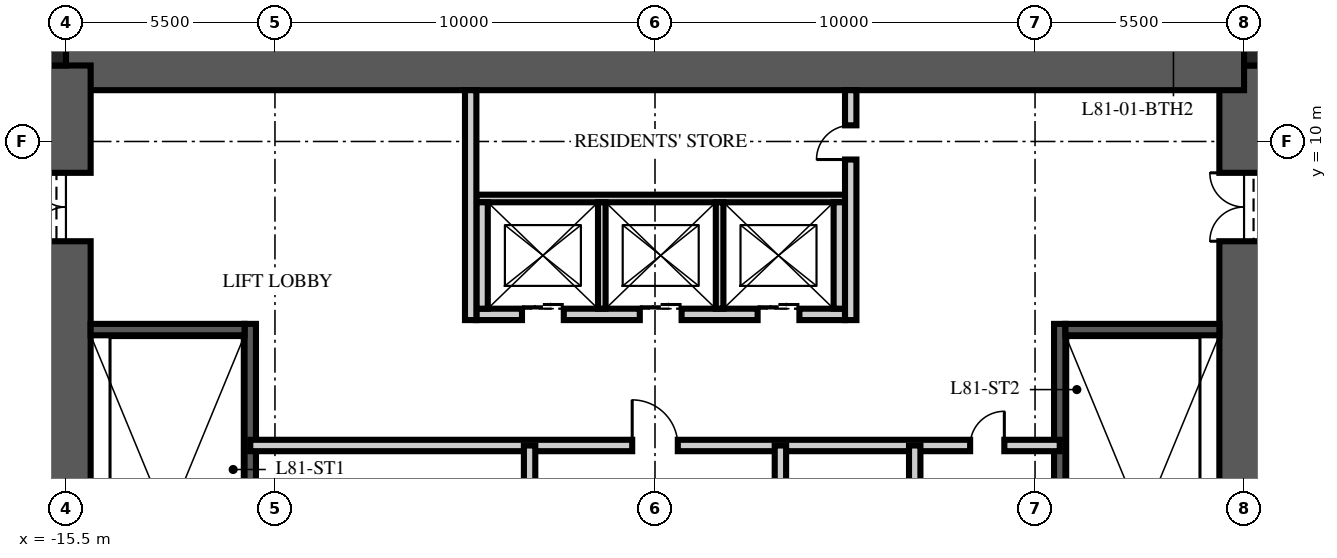
"""IFC4 building model, lengths in metres.
Left out: names, types, materials, properties, quantities, classifications, styles, units other than length and angle.
Written with IfcOpenShell. Run it as: python <this file> out.ifc"""

import sys

from ifc_helpers import new_model, si_unit, direction, frame, frame_2d, origin, origin_2d, place, context, subcontext, project, spatial, rectangle, extrude, element, fill, save


model = new_model("IFC4")
c1 = context("Model", 3, precision=1e-05, world=origin(), true_north=direction((0.0, 1.0)))
c2 = subcontext(c1, "Body", "Model", "MODEL_VIEW")
j1 = project(units=[si_unit("LENGTHUNIT", "METRE"), si_unit("PLANEANGLEUNIT", "RADIAN")], contexts=[c1])
p1 = place(None, origin())
s1 = spatial("IfcSite", under=j1, at=p1, CompositionType="ELEMENT")
p2 = place(p1, origin())
s2 = spatial("IfcBuilding", under=s1, at=p2, CompositionType="ELEMENT")
p3 = place(p2, frame((0.0, 0.0, 323.25)))
s3 = spatial("IfcBuildingStorey", under=s2, at=p3, CompositionType="ELEMENT", Elevation=323.25)
p4 = place(p3, frame((15.5, -12.0, -0.25), z_axis=(0.0, 0.0, 1.0), x_axis=(0.0, 1.0, 0.0)))
e1 = element("IfcWall", 1, at=p4, inside=s3, PredefinedType="SHEAR", context=c2, shape_type="SweptSolid", body=[
    extrude(rectangle(XDim=24.0, YDim=1.3, at=frame_2d((12.0, 0.0))), origin(), (0.0, 0.0, 1.0), 3.75),
])
p5 = place(p4, frame((3.125, 0.0, 0.25)))
e2 = element("IfcOpeningElement", 2, at=p5, cuts=e1, PredefinedType="OPENING", context=c2, shape_type="SweptSolid", body=[
    extrude(rectangle(XDim=1.2, YDim=2.1, at=frame_2d((0.6, 1.05))), frame((0.0, 0.66, 0.0), z_axis=(0.0, -1.0, 0.0), x_axis=(1.0, 0.0, 0.0)), (0.0, 0.0, 1.0), 1.32),
])
p6 = place(p4, frame((19.375, 0.0, 0.25)))
e3 = element("IfcOpeningElement", 3, at=p6, cuts=e1, PredefinedType="OPENING", context=c2, shape_type="SweptSolid", body=[
    extrude(rectangle(XDim=1.8, YDim=2.1, at=frame_2d((0.9, 1.05))), frame((0.0, 0.66, 0.0), z_axis=(0.0, -1.0, 0.0), x_axis=(1.0, 0.0, 0.0)), (0.0, 0.0, 1.0), 1.32),
])
p7 = place(p3, frame((-15.5, 12.0, -0.25), z_axis=(0.0, 0.0, 1.0), x_axis=(1.0, 0.0, 0.0)))
e4 = element("IfcWall", 4, at=p7, inside=s3, PredefinedType="SHEAR", context=c2, shape_type="SweptSolid", body=[
    extrude(rectangle(XDim=31.0, YDim=1.3, at=frame_2d((15.5, 0.0))), origin(), (0.0, 0.0, 1.0), 3.75),
])
p8 = place(p3, frame((-15.5, -12.0, -0.25), z_axis=(0.0, 0.0, 1.0), x_axis=(0.0, 1.0, 0.0)))
e5 = element("IfcWall", 5, at=p8, inside=s3, PredefinedType="SHEAR", context=c2, shape_type="SweptSolid", body=[
    extrude(rectangle(XDim=24.0, YDim=1.3, at=frame_2d((12.0, 0.0))), origin(), (0.0, 0.0, 1.0), 3.75),
])
p9 = place(p8, frame((3.125, 0.0, 0.25)))
e6 = element("IfcOpeningElement", 6, at=p9, cuts=e5, PredefinedType="OPENING", context=c2, shape_type="SweptSolid", body=[
    extrude(rectangle(XDim=1.2, YDim=2.1, at=frame_2d((0.6, 1.05))), frame((0.0, 0.66, 0.0), z_axis=(0.0, -1.0, 0.0), x_axis=(1.0, 0.0, 0.0)), (0.0, 0.0, 1.0), 1.32),
])
p10 = place(p8, frame((19.375, 0.0, 0.25)))
e7 = element("IfcOpeningElement", 7, at=p10, cuts=e5, PredefinedType="OPENING", context=c2, shape_type="SweptSolid", body=[
    extrude(rectangle(XDim=1.8, YDim=2.1, at=frame_2d((0.9, 1.05))), frame((0.0, 0.66, 0.0), z_axis=(0.0, -1.0, 0.0), x_axis=(1.0, 0.0, 0.0)), (0.0, 0.0, 1.0), 1.32),
])
for number, where, z_axis, x_axis in (
    (8, (15.825, 12.325, -0.25), (0.0, 0.0, 1.0), (1.0, 0.0, 0.0)),
    (9, (-15.825, 12.325, -0.25), (0.0, 0.0, 1.0), (1.0, 0.0, 0.0)),
):
    element("IfcColumn", number, at=place(p3, frame(where, z_axis=z_axis, x_axis=x_axis)), inside=s3, PredefinedType="COLUMN", context=c2, shape_type="SweptSolid", body=[
        extrude(rectangle(XDim=0.65, YDim=0.65, at=origin_2d()), origin(), (0.0, 0.0, 1.0), 3.75),
    ])
p11 = place(p3, frame((-10.65, -4.9, 0.0), z_axis=(0.0, 0.0, 1.0), x_axis=(0.0, 1.0, 0.0)))
e10 = element("IfcWall", 10, at=p11, inside=s3, PredefinedType="SOLIDWALL", context=c2, shape_type="SweptSolid", body=[
    extrude(rectangle(XDim=10.1, YDim=0.3, at=frame_2d((5.05, 0.0))), origin(), (0.0, 0.0, 1.0), 3.5),
])
p12 = place(p3, frame((-14.85, 5.05, 0.0), z_axis=(0.0, 0.0, 1.0), x_axis=(1.0, 0.0, 0.0)))
e11 = element("IfcWall", 11, at=p12, inside=s3, PredefinedType="SOLIDWALL", context=c2, shape_type="SweptSolid", body=[
    extrude(rectangle(XDim=4.05, YDim=0.3, at=frame_2d((2.025, 0.0))), origin(), (0.0, 0.0, 1.0), 3.5),
])
p13 = place(p3, frame((10.65, -4.9, 0.0), z_axis=(0.0, 0.0, 1.0), x_axis=(0.0, 1.0, 0.0)))
e12 = element("IfcWall", 12, at=p13, inside=s3, PredefinedType="SOLIDWALL", context=c2, shape_type="SweptSolid", body=[
    extrude(rectangle(XDim=10.1, YDim=0.3, at=frame_2d((5.05, 0.0))), origin(), (0.0, 0.0, 1.0), 3.5),
])
p14 = place(p3, frame((14.85, 5.05, 0.0), z_axis=(0.0, 0.0, 1.0), x_axis=(-1.0, 0.0, 0.0)))
e13 = element("IfcWall", 13, at=p14, inside=s3, PredefinedType="SOLIDWALL", context=c2, shape_type="SweptSolid", body=[
    extrude(rectangle(XDim=4.05, YDim=0.3, at=frame_2d((2.025, 0.0))), origin(), (0.0, 0.0, 1.0), 3.5),
])
p15 = place(p3, frame((-4.7, 5.45, 0.0), z_axis=(0.0, 0.0, 1.0), x_axis=(1.0, 0.0, 0.0)))
e14 = element("IfcWall", 14, at=p15, inside=s3, PredefinedType="PARTITIONING", context=c2, shape_type="SweptSolid", body=[
    extrude(rectangle(XDim=9.7, YDim=0.3, at=frame_2d((4.85, 0.0))), origin(), (0.0, 0.0, 1.0), 3.5),
])
p16 = place(p15, frame((1.2, 0.0, 0.0)))
e15 = element("IfcOpeningElement", 15, at=p16, cuts=e14, PredefinedType="OPENING", context=c2, shape_type="SweptSolid", body=[
    extrude(rectangle(XDim=1.1, YDim=2.1, at=frame_2d((0.55, 1.05))), frame((0.0, 0.16, 0.0), z_axis=(0.0, -1.0, 0.0), x_axis=(1.0, 0.0, 0.0)), (0.0, 0.0, 1.0), 0.32),
])
p17 = place(p15, frame((4.3, 0.0, 0.0)))
e16 = element("IfcOpeningElement", 16, at=p17, cuts=e14, PredefinedType="OPENING", context=c2, shape_type="SweptSolid", body=[
    extrude(rectangle(XDim=1.1, YDim=2.1, at=frame_2d((0.55, 1.05))), frame((0.0, 0.16, 0.0), z_axis=(0.0, -1.0, 0.0), x_axis=(1.0, 0.0, 0.0)), (0.0, 0.0, 1.0), 0.32),
])
p18 = place(p15, frame((7.4, 0.0, 0.0)))
e17 = element("IfcOpeningElement", 17, at=p18, cuts=e14, PredefinedType="OPENING", context=c2, shape_type="SweptSolid", body=[
    extrude(rectangle(XDim=1.1, YDim=2.1, at=frame_2d((0.55, 1.05))), frame((0.0, 0.16, 0.0), z_axis=(0.0, -1.0, 0.0), x_axis=(1.0, 0.0, 0.0)), (0.0, 0.0, 1.0), 0.32),
])
p19 = place(p3, frame((-4.7, 8.5, 0.0), z_axis=(0.0, 0.0, 1.0), x_axis=(1.0, 0.0, 0.0)))
e18 = element("IfcWall", 18, at=p19, inside=s3, PredefinedType="PARTITIONING", context=c2, shape_type="SweptSolid", body=[
    extrude(rectangle(XDim=9.7, YDim=0.2, at=frame_2d((4.85, 0.0))), origin(), (0.0, 0.0, 1.0), 3.5),
])
for number, where, z_axis, x_axis in (
    (19, (-4.55, 5.6, 0.0), (0.0, 0.0, 1.0), (0.0, 1.0, 0.0)),
    (20, (4.85, 5.6, 0.0), (0.0, 0.0, 1.0), (0.0, 1.0, 0.0)),
):
    element("IfcWall", number, at=place(p3, frame(where, z_axis=z_axis, x_axis=x_axis)), inside=s3, PredefinedType="PARTITIONING", context=c2, shape_type="SweptSolid", body=[
        extrude(rectangle(XDim=2.8, YDim=0.3, at=frame_2d((1.4, 0.0))), origin(), (0.0, 0.0, 1.0), 3.5),
    ])
for number, where, z_axis, x_axis in (
    (21, (-1.4, 5.6, 0.0), (0.0, 0.0, 1.0), (0.0, 1.0, 0.0)),
    (22, (1.7, 5.6, 0.0), (0.0, 0.0, 1.0), (0.0, 1.0, 0.0)),
):
    element("IfcWall", number, at=place(p3, frame(where, z_axis=z_axis, x_axis=x_axis)), inside=s3, PredefinedType="PARTITIONING", context=c2, shape_type="SweptSolid", body=[
        extrude(rectangle(XDim=2.8, YDim=0.2, at=frame_2d((1.4, 0.0))), origin(), (0.0, 0.0, 1.0), 3.5),
    ])
p20 = place(p3, frame((-10.65, 2.0, 0.0), z_axis=(0.0, 0.0, 1.0), x_axis=(1.0, 0.0, 0.0)))
e23 = element("IfcWall", 23, at=p20, inside=s3, PredefinedType="PARTITIONING", context=c2, shape_type="SweptSolid", body=[
    extrude(rectangle(XDim=21.3, YDim=0.3, at=frame_2d((10.65, 0.0))), origin(), (0.0, 0.0, 1.0), 3.5),
])
p21 = place(p20, frame((10.05, 0.0, 0.0)))
e24 = element("IfcOpeningElement", 24, at=p21, cuts=e23, PredefinedType="OPENING", context=c2, shape_type="SweptSolid", body=[
    extrude(rectangle(XDim=1.2, YDim=2.1, at=frame_2d((0.6, 1.05))), frame((0.0, 0.16, 0.0), z_axis=(0.0, -1.0, 0.0), x_axis=(1.0, 0.0, 0.0)), (0.0, 0.0, 1.0), 0.32),
])
p22 = place(p20, frame((18.942, 0.0, 0.0)))
e25 = element("IfcOpeningElement", 25, at=p22, cuts=e23, PredefinedType="OPENING", context=c2, shape_type="SweptSolid", body=[
    extrude(rectangle(XDim=0.9, YDim=2.1, at=frame_2d((0.45, 1.05))), frame((0.0, 0.16, 0.0), z_axis=(0.0, -1.0, 0.0), x_axis=(1.0, 0.0, 0.0)), (0.0, 0.0, 1.0), 0.32),
])
p23 = place(p3, frame((-3.3, -6.65, 0.0), z_axis=(0.0, 0.0, 1.0), x_axis=(0.0, 1.0, 0.0)))
e26 = element("IfcWall", 26, at=p23, inside=s3, PredefinedType="PARTITIONING", context=c2, shape_type="SweptSolid", body=[
    extrude(rectangle(XDim=8.65, YDim=0.3, at=frame_2d((4.325, 0.0))), origin(), (0.0, 0.0, 1.0), 3.5),
])
p24 = place(p23, frame((1.75, 0.0, 0.0)))
e27 = element("IfcOpeningElement", 27, at=p24, cuts=e26, PredefinedType="OPENING", context=c2, shape_type="SweptSolid", body=[
    extrude(rectangle(XDim=0.9, YDim=2.1, at=frame_2d((0.45, 1.05))), frame((0.0, 0.16, 0.0), z_axis=(0.0, -1.0, 0.0), x_axis=(1.0, 0.0, 0.0)), (0.0, 0.0, 1.0), 0.32),
])
p25 = place(p23, frame((6.075, 0.0, 0.0)))
e28 = element("IfcOpeningElement", 28, at=p25, cuts=e26, PredefinedType="OPENING", context=c2, shape_type="SweptSolid", body=[
    extrude(rectangle(XDim=0.9, YDim=2.1, at=frame_2d((0.45, 1.05))), frame((0.0, 0.16, 0.0), z_axis=(0.0, -1.0, 0.0), x_axis=(1.0, 0.0, 0.0)), (0.0, 0.0, 1.0), 0.32),
])
p26 = place(p3, frame((3.3, -6.65, 0.0), z_axis=(0.0, 0.0, 1.0), x_axis=(0.0, 1.0, 0.0)))
e29 = element("IfcWall", 29, at=p26, inside=s3, PredefinedType="PARTITIONING", context=c2, shape_type="SweptSolid", body=[
    extrude(rectangle(XDim=8.65, YDim=0.3, at=frame_2d((4.325, 0.0))), origin(), (0.0, 0.0, 1.0), 3.5),
])
p27 = place(p26, frame((3.875, 0.0, 0.0)))
e30 = element("IfcOpeningElement", 30, at=p27, cuts=e29, PredefinedType="OPENING", context=c2, shape_type="SweptSolid", body=[
    extrude(rectangle(XDim=0.9, YDim=2.1, at=frame_2d((0.45, 1.05))), frame((0.0, 0.16, 0.0), z_axis=(0.0, -1.0, 0.0), x_axis=(1.0, 0.0, 0.0)), (0.0, 0.0, 1.0), 0.32),
])
p28 = place(p3, frame((6.834, -6.65, 0.0), z_axis=(0.0, 0.0, 1.0), x_axis=(0.0, 1.0, 0.0)))
e31 = element("IfcWall", 31, at=p28, inside=s3, PredefinedType="PARTITIONING", context=c2, shape_type="SweptSolid", body=[
    extrude(rectangle(XDim=8.65, YDim=0.3, at=frame_2d((4.325, 0.0))), origin(), (0.0, 0.0, 1.0), 3.5),
])
p29 = place(p3, frame((-4.85, 5.3, 0.0), z_axis=(0.0, 0.0, 1.0), x_axis=(0.0, 1.0, 0.0)))
e32 = element("IfcWall", 32, at=p29, inside=s3, PredefinedType="PARTITIONING", context=c2, shape_type="SweptSolid", body=[
    extrude(rectangle(XDim=6.05, YDim=0.3, at=frame_2d((3.025, 0.0))), origin(), (0.0, 0.0, 1.0), 3.5),
])
p30 = place(p3, frame((5.15, 5.3, 0.0), z_axis=(0.0, 0.0, 1.0), x_axis=(0.0, 1.0, 0.0)))
e33 = element("IfcWall", 33, at=p30, inside=s3, PredefinedType="PARTITIONING", context=c2, shape_type="SweptSolid", body=[
    extrude(rectangle(XDim=6.05, YDim=0.3, at=frame_2d((3.025, 0.0))), origin(), (0.0, 0.0, 1.0), 3.5),
])
p31 = place(p30, frame((4.225, 0.0, 0.0)))
e34 = element("IfcOpeningElement", 34, at=p31, cuts=e33, PredefinedType="OPENING", context=c2, shape_type="SweptSolid", body=[
    extrude(rectangle(XDim=0.9, YDim=2.1, at=frame_2d((0.45, 1.05))), frame((0.0, 0.16, 0.0), z_axis=(0.0, -1.0, 0.0), x_axis=(1.0, 0.0, 0.0)), (0.0, 0.0, 1.0), 0.32),
])
p32 = place(p10, origin())
e35 = element("IfcDoor", 35, at=p32, inside=s3, OperationType="DOUBLE_DOOR_SINGLE_SWING", PredefinedType="DOOR", context=c2, shape_type="SweptSolid", body=[
    extrude(rectangle(XDim=1.8, YDim=2.1, at=frame_2d((0.9, 1.05))), frame((0.0, 0.025, 0.0), z_axis=(0.0, -1.0, 0.0), x_axis=(1.0, 0.0, 0.0)), (0.0, 0.0, 1.0), 0.05),
])
fill(e7, e35)
p33 = place(p6, origin())
e36 = element("IfcDoor", 36, at=p33, inside=s3, OperationType="DOUBLE_DOOR_SINGLE_SWING", PredefinedType="DOOR", context=c2, shape_type="SweptSolid", body=[
    extrude(rectangle(XDim=1.8, YDim=2.1, at=frame_2d((0.9, 1.05))), frame((0.0, 0.025, 0.0), z_axis=(0.0, -1.0, 0.0), x_axis=(1.0, 0.0, 0.0)), (0.0, 0.0, 1.0), 0.05),
])
fill(e3, e36)
p34 = place(p16, origin())
e37 = element("IfcDoor", 37, at=p34, inside=s3, OperationType="DOUBLE_DOOR_SLIDING", PredefinedType="DOOR", context=c2, shape_type="SweptSolid", body=[
    extrude(rectangle(XDim=1.1, YDim=2.1, at=frame_2d((0.55, 1.05))), frame((0.0, 0.025, 0.0), z_axis=(0.0, -1.0, 0.0), x_axis=(1.0, 0.0, 0.0)), (0.0, 0.0, 1.0), 0.05),
])
fill(e15, e37)
p35 = place(p17, origin())
e38 = element("IfcDoor", 38, at=p35, inside=s3, OperationType="DOUBLE_DOOR_SLIDING", PredefinedType="DOOR", context=c2, shape_type="SweptSolid", body=[
    extrude(rectangle(XDim=1.1, YDim=2.1, at=frame_2d((0.55, 1.05))), frame((0.0, 0.025, 0.0), z_axis=(0.0, -1.0, 0.0), x_axis=(1.0, 0.0, 0.0)), (0.0, 0.0, 1.0), 0.05),
])
fill(e16, e38)
p36 = place(p18, origin())
e39 = element("IfcDoor", 39, at=p36, inside=s3, OperationType="DOUBLE_DOOR_SLIDING", PredefinedType="DOOR", context=c2, shape_type="SweptSolid", body=[
    extrude(rectangle(XDim=1.1, YDim=2.1, at=frame_2d((0.55, 1.05))), frame((0.0, 0.025, 0.0), z_axis=(0.0, -1.0, 0.0), x_axis=(1.0, 0.0, 0.0)), (0.0, 0.0, 1.0), 0.05),
])
fill(e17, e39)
p37 = place(p21, origin())
e40 = element("IfcDoor", 40, at=p37, inside=s3, OperationType="SINGLE_SWING_LEFT", PredefinedType="DOOR", context=c2, shape_type="SweptSolid", body=[
    extrude(rectangle(XDim=1.2, YDim=2.1, at=frame_2d((0.6, 1.05))), frame((0.0, 0.025, 0.0), z_axis=(0.0, -1.0, 0.0), x_axis=(1.0, 0.0, 0.0)), (0.0, 0.0, 1.0), 0.05),
])
fill(e24, e40)
p38 = place(p22, origin())
e41 = element("IfcDoor", 41, at=p38, inside=s3, OperationType="SINGLE_SWING_RIGHT", PredefinedType="DOOR", context=c2, shape_type="SweptSolid", body=[
    extrude(rectangle(XDim=0.9, YDim=2.1, at=frame_2d((0.45, 1.05))), frame((0.0, 0.025, 0.0), z_axis=(0.0, -1.0, 0.0), x_axis=(1.0, 0.0, 0.0)), (0.0, 0.0, 1.0), 0.05),
])
fill(e25, e41)
p39 = place(p31, origin())
e42 = element("IfcDoor", 42, at=p39, inside=s3, OperationType="SINGLE_SWING_LEFT", PredefinedType="DOOR", context=c2, shape_type="SweptSolid", body=[
    extrude(rectangle(XDim=0.9, YDim=2.1, at=frame_2d((0.45, 1.05))), frame((0.0, 0.025, 0.0), z_axis=(0.0, -1.0, 0.0), x_axis=(1.0, 0.0, 0.0)), (0.0, 0.0, 1.0), 0.05),
])
fill(e34, e42)
save(model, sys.argv[1])
